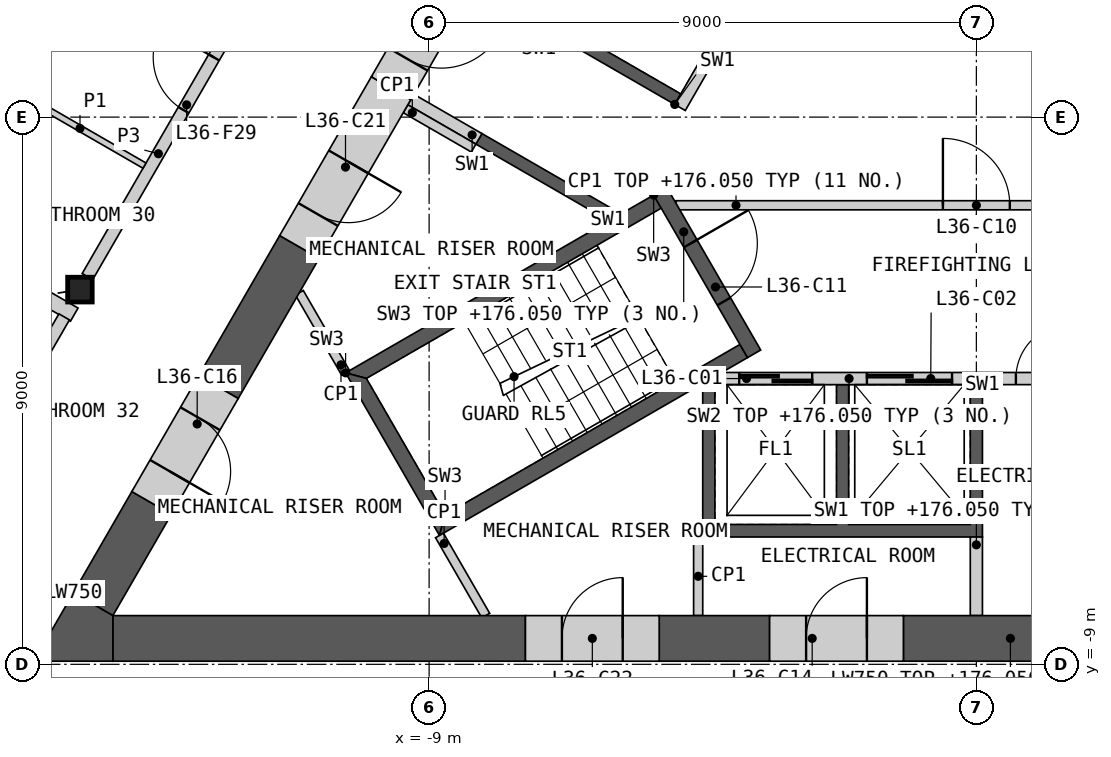
"""IFC4 building model, lengths in metres.
Left out: names, types, materials, properties, quantities, classifications, styles, units other than length and angle.
Written with IfcOpenShell. Run it as: python <this file> out.ifc"""

import sys

from ifc_helpers import new_model, si_unit, direction, frame, frame_2d, origin, origin_2d, place, context, subcontext, project, spatial, polyline, rectangle, i_section, outline, extrude, element, fill, save


model = new_model("IFC4")
c1 = context("Model", 3, precision=1e-05, world=origin(), true_north=direction((0.0, 1.0)))
c2 = subcontext(c1, "Body", "Model", "MODEL_VIEW")
j1 = project(units=[si_unit("LENGTHUNIT", "METRE"), si_unit("PLANEANGLEUNIT", "RADIAN")], contexts=[c1])
p1 = place(None, origin())
s1 = spatial("IfcSite", under=j1, at=p1, CompositionType="ELEMENT")
p2 = place(p1, origin())
s2 = spatial("IfcBuilding", under=s1, at=p2, CompositionType="ELEMENT")
p3 = place(p2, frame((0.0, 0.0, 172.8)))
s3 = spatial("IfcBuildingStorey", under=s2, at=p3, CompositionType="ELEMENT", Elevation=172.8)
p4 = place(p3, frame((-14.743, -2.837, 0.0), z_axis=(0.0, 0.0, 1.0), x_axis=(1.0, 0.0, 0.0)))
e1 = element("IfcColumn", 1, at=p4, inside=s3, PredefinedType="COLUMN", context=c2, shape_type="SweptSolid", body=[
    extrude(i_section(OverallWidth=0.404, OverallDepth=0.407, WebThickness=0.027, FlangeThickness=0.044, at=origin_2d()), origin(), (0.0, 0.0, 1.0), 3.6),
])
p5 = place(p3, origin())
e2 = element("IfcWall", 2, at=p5, inside=s3, PredefinedType="SHEAR", context=c2, shape_type="SweptSolid", body=[
    extrude(outline(polyline([(0.1, -4.4), (0.1, -6.906), (-4.5, -6.906), (-4.5, -4.4), (-4.3, -4.4), (-4.3, -6.7), (-2.3, -6.7), (-2.3, -4.4), (-2.1, -4.4), (-2.1, -6.7), (-0.1, -6.7), (-0.1, -4.4), (0.1, -4.4)])), origin(), (0.0, 0.0, 1.0), 3.25),
])
p6 = place(p3, frame((-4.187, -4.3, 0.0), z_axis=(0.0, 0.0, 1.0), x_axis=(1.0, 0.0, 0.0)))
e3 = element("IfcWall", 3, at=p6, inside=s3, PredefinedType="SOLIDWALL", context=c2, shape_type="SweptSolid", body=[
    extrude(rectangle(XDim=8.373, YDim=0.2, at=frame_2d((4.187, 0.0))), origin(), (0.0, 0.0, 1.0), 3.25),
])
p7 = place(p6, frame((0.287, 0.0, 0.0)))
e4 = element("IfcOpeningElement", 4, at=p7, cuts=e3, PredefinedType="OPENING", context=c2, shape_type="SweptSolid", body=[
    extrude(rectangle(XDim=1.2, YDim=2.1, at=frame_2d((0.6, 1.05))), frame((0.0, 0.11, 0.0), z_axis=(0.0, -1.0, 0.0), x_axis=(1.0, 0.0, 0.0)), (0.0, 0.0, 1.0), 0.22),
])
p8 = place(p6, frame((2.387, 0.0, 0.0)))
e5 = element("IfcOpeningElement", 5, at=p8, cuts=e3, PredefinedType="OPENING", context=c2, shape_type="SweptSolid", body=[
    extrude(rectangle(XDim=1.4, YDim=2.1, at=frame_2d((0.7, 1.05))), frame((0.0, 0.11, 0.0), z_axis=(0.0, -1.0, 0.0), x_axis=(1.0, 0.0, 0.0)), (0.0, 0.0, 1.0), 0.22),
])
p9 = place(p6, frame((4.837, 0.0, 0.0)))
e6 = element("IfcOpeningElement", 6, at=p9, cuts=e3, PredefinedType="OPENING", context=c2, shape_type="SweptSolid", body=[
    extrude(rectangle(XDim=0.9, YDim=2.1, at=frame_2d((0.45, 1.05))), frame((0.0, 0.11, 0.0), z_axis=(0.0, -1.0, 0.0), x_axis=(1.0, 0.0, 0.0)), (0.0, 0.0, 1.0), 0.22),
])
p10 = place(p6, frame((6.887, 0.0, 0.0)))
e7 = element("IfcOpeningElement", 7, at=p10, cuts=e3, PredefinedType="OPENING", context=c2, shape_type="SweptSolid", body=[
    extrude(rectangle(XDim=1.2, YDim=2.1, at=frame_2d((0.6, 1.05))), frame((0.0, 0.11, 0.0), z_axis=(0.0, -1.0, 0.0), x_axis=(1.0, 0.0, 0.0)), (0.0, 0.0, 1.0), 0.22),
])
p11 = place(p3, frame((0.0, -6.906, 0.0), z_axis=(0.0, 0.0, 1.0), x_axis=(0.0, -1.0, 0.0)))
e8 = element("IfcWall", 8, at=p11, inside=s3, PredefinedType="SHEAR", context=c2, shape_type="SweptSolid", body=[
    extrude(rectangle(XDim=1.293, YDim=0.2, at=frame_2d((0.646, 0.0))), origin(), (0.0, 0.0, 1.0), 3.25),
])
p12 = place(p3, origin())
e9 = element("IfcWall", 9, at=p12, inside=s3, PredefinedType="SHEAR", context=c2, shape_type="SweptSolid", body=[
    extrude(outline(polyline([(-6.061, -1.697), (-8.231, -0.444), (-8.131, -0.271), (-5.96, -1.524), (-6.061, -1.697)])), origin(), (0.0, 0.0, 1.0), 3.25),
])
p13 = place(p3, origin())
e10 = element("IfcWall", 10, at=p13, inside=s3, PredefinedType="SHEAR", context=c2, shape_type="SweptSolid", body=[
    extrude(outline(polyline([(-4.96, 0.208), (-7.131, 1.461), (-3.731, 7.35), (-1.561, 6.097), (-1.66, 5.924), (-3.652, 7.074), (-4.652, 5.342), (-2.66, 4.192), (-2.76, 4.019), (-4.752, 5.169), (-5.752, 3.437), (-3.76, 2.287), (-3.861, 2.113), (-5.852, 3.263), (-6.852, 1.531), (-4.861, 0.381), (-4.96, 0.208)])), origin(), (0.0, 0.0, 1.0), 3.25),
])
p14 = place(p3, frame((-1.631, 5.776, 0.0), z_axis=(0.0, 0.0, 1.0), x_axis=(-0.499992876559, -0.866029516466, 0.0)))
e11 = element("IfcWall", 11, at=p14, inside=s3, PredefinedType="SOLIDWALL", context=c2, shape_type="SweptSolid", body=[
    extrude(rectangle(XDim=6.486, YDim=0.2, at=frame_2d((3.243, 0.0))), origin(), (0.0, 0.0, 1.0), 3.25),
])
p15 = place(p14, frame((0.337, 0.0, 0.0)))
e12 = element("IfcOpeningElement", 12, at=p15, cuts=e11, PredefinedType="OPENING", context=c2, shape_type="SweptSolid", body=[
    extrude(rectangle(XDim=1.1, YDim=2.1, at=frame_2d((0.55, 1.05))), frame((0.0, 0.11, 0.0), z_axis=(0.0, -1.0, 0.0), x_axis=(1.0, 0.0, 0.0)), (0.0, 0.0, 1.0), 0.22),
])
p16 = place(p14, frame((2.537, 0.0, 0.0)))
e13 = element("IfcOpeningElement", 13, at=p16, cuts=e11, PredefinedType="OPENING", context=c2, shape_type="SweptSolid", body=[
    extrude(rectangle(XDim=1.1, YDim=2.1, at=frame_2d((0.55, 1.05))), frame((0.0, 0.11, 0.0), z_axis=(0.0, -1.0, 0.0), x_axis=(1.0, 0.0, 0.0)), (0.0, 0.0, 1.0), 0.22),
])
p17 = place(p3, frame((-8.181, -0.357, 0.0), z_axis=(0.0, 0.0, 1.0), x_axis=(-0.866003189247, 0.500038474733, 0.0)))
e14 = element("IfcWall", 14, at=p17, inside=s3, PredefinedType="SHEAR", context=c2, shape_type="SweptSolid", body=[
    extrude(rectangle(XDim=1.293, YDim=0.2, at=frame_2d((0.646, 0.0))), origin(), (0.0, 0.0, 1.0), 3.25),
])
p18 = place(p3, frame((-4.941, -1.45, 0.0), z_axis=(0.0, 0.0, 1.0), x_axis=(1.0, 0.0, 0.0)))
e15 = element("IfcWall", 15, at=p18, inside=s3, PredefinedType="PARTITIONING", context=c2, shape_type="SweptSolid", body=[
    extrude(rectangle(XDim=9.882, YDim=0.15, at=frame_2d((4.941, 0.0))), origin(), (0.0, 0.0, 1.0), 3.25),
])
p19 = place(p18, frame((4.391, 0.0, 0.0)))
e16 = element("IfcOpeningElement", 16, at=p19, cuts=e15, PredefinedType="OPENING", context=c2, shape_type="SweptSolid", body=[
    extrude(rectangle(XDim=1.1, YDim=2.1, at=frame_2d((0.55, 1.05))), frame((0.0, 0.085, 0.0), z_axis=(0.0, -1.0, 0.0), x_axis=(1.0, 0.0, 0.0)), (0.0, 0.0, 1.0), 0.17),
])
p20 = place(p3, origin())
e17 = element("IfcWall", 17, at=p20, inside=s3, PredefinedType="SHEAR", context=c2, shape_type="SweptSolid", body=[
    extrude(outline(polyline([(-5.307, -1.281), (-10.374, -4.206), (-10.032, -4.298), (-5.182, -1.498), (-5.307, -1.281)])), origin(), (0.0, 0.0, 1.0), 3.25),
])
p21 = place(p3, origin())
e18 = element("IfcWall", 18, at=p21, inside=s3, PredefinedType="SHEAR", context=c2, shape_type="SweptSolid", body=[
    extrude(outline(polyline([(-10.374, -4.206), (-8.83, -6.881), (-8.738, -6.539), (-10.032, -4.298), (-10.374, -4.206)])), origin(), (0.0, 0.0, 1.0), 3.25),
])
p22 = place(p3, origin())
e19 = element("IfcWall", 19, at=p22, inside=s3, PredefinedType="SHEAR", context=c2, shape_type="SweptSolid", body=[
    extrude(outline(polyline([(-8.738, -6.539), (-8.83, -6.881), (-3.763, -3.956), (-3.888, -3.739), (-8.738, -6.539)])), origin(), (0.0, 0.0, 1.0), 3.25),
])
p23 = place(p3, frame((-5.199, -1.219, 0.0), z_axis=(0.0, 0.0, 1.0), x_axis=(0.499982516597, -0.866035497597, 0.0)))
e20 = element("IfcWall", 20, at=p23, inside=s3, PredefinedType="SHEAR", context=c2, shape_type="SweptSolid", body=[
    extrude(rectangle(XDim=3.088, YDim=0.25, at=frame_2d((1.544, 0.0))), origin(), (0.0, 0.0, 1.0), 3.25),
])
p24 = place(p23, frame((0.994, 0.0, 0.0)))
e21 = element("IfcOpeningElement", 21, at=p24, cuts=e20, PredefinedType="OPENING", context=c2, shape_type="SweptSolid", body=[
    extrude(rectangle(XDim=1.1, YDim=2.1, at=frame_2d((0.55, 1.05))), frame((0.0, 0.135, 0.0), z_axis=(0.0, -1.0, 0.0), x_axis=(1.0, 0.0, 0.0)), (0.0, 0.0, 1.0), 0.27),
])
for number, where, z_axis, x_axis in (
    (22, (-4.575, -6.906, 0.0), (0.0, 0.0, 1.0), (0.0, -1.0, 0.0)),
    (23, (-8.268, -0.509, 0.0), (0.0, 0.0, 1.0), (-0.866, 0.5, 0.0)),
):
    element("IfcWall", number, at=place(p3, frame(where, z_axis=z_axis, x_axis=x_axis)), inside=s3, PredefinedType="PARTITIONING", context=c2, shape_type="SweptSolid", body=[
        extrude(rectangle(XDim=1.293, YDim=0.15, at=frame_2d((0.646, 0.0))), origin(), (0.0, 0.0, 1.0), 3.25),
    ])
for number, where, z_axis, x_axis in (
    (24, (-8.83, -6.881, 0.0), (0.0, 0.0, 1.0), (0.5, -0.866, 0.0)),
    (25, (-10.374, -4.206, 0.0), (0.0, 0.0, 1.0), (-0.5, 0.866, 0.0)),
):
    element("IfcWall", number, at=place(p3, frame(where, z_axis=z_axis, x_axis=x_axis)), inside=s3, PredefinedType="PARTITIONING", context=c2, shape_type="SweptSolid", body=[
        extrude(rectangle(XDim=1.522, YDim=0.15, at=frame_2d((0.761, 0.0))), origin(), (0.0, 0.0, 1.0), 3.25),
    ])
p25 = place(p3, frame((-14.201, -8.574, 0.0), z_axis=(0.0, 0.0, 1.0), x_axis=(1.0, 0.0, 0.0)))
e26 = element("IfcWall", 26, at=p25, inside=s3, PredefinedType="SHEAR", context=c2, shape_type="SweptSolid", body=[
    extrude(rectangle(XDim=6.785, YDim=0.75, at=frame_2d((3.393, 0.0))), origin(), (0.0, 0.0, 1.0), 3.25),
])
p26 = place(p3, frame((-1.2, -8.574, 0.0), z_axis=(0.0, 0.0, 1.0), x_axis=(1.0, 0.0, 0.0)))
e27 = element("IfcWall", 27, at=p26, inside=s3, PredefinedType="SHEAR", context=c2, shape_type="SweptSolid", body=[
    extrude(rectangle(XDim=3.52, YDim=0.75, at=frame_2d((1.76, 0.0))), origin(), (0.0, 0.0, 1.0), 3.25),
])
p27 = place(p3, frame((-5.216, -8.574, 0.0), z_axis=(0.0, 0.0, 1.0), x_axis=(1.0, 0.0, 0.0)))
e28 = element("IfcWall", 28, at=p27, inside=s3, PredefinedType="SHEAR", context=c2, shape_type="SweptSolid", body=[
    extrude(rectangle(XDim=1.816, YDim=0.75, at=frame_2d((0.908, 0.0))), origin(), (0.0, 0.0, 1.0), 3.25),
])
p28 = place(p3, frame((-11.133, -2.135, 0.0), z_axis=(0.0, 0.0, 1.0), x_axis=(-0.499936812382, -0.866061882099, 0.0)))
e29 = element("IfcWall", 29, at=p28, inside=s3, PredefinedType="SHEAR", context=c2, shape_type="SweptSolid", body=[
    extrude(rectangle(XDim=2.662, YDim=0.75, at=frame_2d((1.331, 0.0))), origin(), (0.0, 0.0, 1.0), 3.25),
])
p29 = place(p3, frame((-13.564, -6.346, 0.0), z_axis=(0.0, 0.0, 1.0), x_axis=(-0.499989888488, -0.86603124159, 0.0)))
e30 = element("IfcWall", 30, at=p29, inside=s3, PredefinedType="SHEAR", context=c2, shape_type="SweptSolid", body=[
    extrude(rectangle(XDim=1.923, YDim=0.75, at=frame_2d((0.961, 0.0))), origin(), (0.0, 0.0, 1.0), 3.25),
])
p30 = place(p3, origin())
e31 = element("IfcWall", 31, at=p30, inside=s3, PredefinedType="SHEAR", context=c2, shape_type="SweptSolid", body=[
    extrude(outline(polyline([(-14.851, -7.824), (-14.201, -8.199), (-14.201, -8.949), (-15.5, -8.949), (-14.851, -7.824)])), origin(), (0.0, 0.0, 1.0), 3.25),
])
p31 = place(p3, frame((-3.4, -8.574, 0.0), z_axis=(0.0, 0.0, 1.0), x_axis=(1.0, 0.0, 0.0)))
e32 = element("IfcWall", 32, at=p31, inside=s3, PredefinedType="SHEAR", context=c2, shape_type="SweptSolid", body=[
    extrude(rectangle(XDim=2.2, YDim=0.75, at=frame_2d((1.1, 0.0))), origin(), (0.0, 0.0, 1.0), 3.25),
])
p32 = place(p31, frame((0.6, 0.0, 0.0)))
e33 = element("IfcOpeningElement", 33, at=p32, cuts=e32, PredefinedType="OPENING", context=c2, shape_type="SweptSolid", body=[
    extrude(rectangle(XDim=1.0, YDim=2.1, at=frame_2d((0.5, 1.05))), frame((0.0, 0.385, 0.0), z_axis=(0.0, -1.0, 0.0), x_axis=(1.0, 0.0, 0.0)), (0.0, 0.0, 1.0), 0.77),
])
p33 = place(p3, frame((-12.464, -4.441, 0.0), z_axis=(0.0, 0.0, 1.0), x_axis=(-0.499994660107, -0.866028486751, 0.0)))
e34 = element("IfcWall", 34, at=p33, inside=s3, PredefinedType="SHEAR", context=c2, shape_type="SweptSolid", body=[
    extrude(rectangle(XDim=2.2, YDim=0.75, at=frame_2d((1.1, 0.0))), origin(), (0.0, 0.0, 1.0), 3.25),
])
p34 = place(p33, frame((0.6, 0.0, 0.0)))
e35 = element("IfcOpeningElement", 35, at=p34, cuts=e34, PredefinedType="OPENING", context=c2, shape_type="SweptSolid", body=[
    extrude(rectangle(XDim=1.0, YDim=2.1, at=frame_2d((0.5, 1.05))), frame((0.0, 0.385, 0.0), z_axis=(0.0, -1.0, 0.0), x_axis=(1.0, 0.0, 0.0)), (0.0, 0.0, 1.0), 0.77),
])
p35 = place(p3, frame((-9.625, 0.477, 0.0), z_axis=(0.0, 0.0, 1.0), x_axis=(-0.499995718215, -0.86602787586, 0.0)))
e36 = element("IfcWall", 36, at=p35, inside=s3, PredefinedType="SHEAR", context=c2, shape_type="SweptSolid", body=[
    extrude(rectangle(XDim=3.016, YDim=0.75, at=frame_2d((1.508, 0.0))), origin(), (0.0, 0.0, 1.0), 3.25),
])
p36 = place(p35, frame((1.4, 0.0, 0.0)))
e37 = element("IfcOpeningElement", 37, at=p36, cuts=e36, PredefinedType="OPENING", context=c2, shape_type="SweptSolid", body=[
    extrude(rectangle(XDim=1.0, YDim=2.1, at=frame_2d((0.5, 1.05))), frame((0.0, 0.385, 0.0), z_axis=(0.0, -1.0, 0.0), x_axis=(1.0, 0.0, 0.0)), (0.0, 0.0, 1.0), 0.77),
])
p37 = place(p3, frame((-7.416, -8.574, 0.0), z_axis=(0.0, 0.0, 1.0), x_axis=(1.0, 0.0, 0.0)))
e38 = element("IfcWall", 38, at=p37, inside=s3, PredefinedType="SHEAR", context=c2, shape_type="SweptSolid", body=[
    extrude(rectangle(XDim=2.2, YDim=0.75, at=frame_2d((1.1, 0.0))), origin(), (0.0, 0.0, 1.0), 3.25),
])
p38 = place(p37, frame((0.6, 0.0, 0.0)))
e39 = element("IfcOpeningElement", 39, at=p38, cuts=e38, PredefinedType="OPENING", context=c2, shape_type="SweptSolid", body=[
    extrude(rectangle(XDim=1.0, YDim=2.1, at=frame_2d((0.5, 1.05))), frame((0.0, 0.385, 0.0), z_axis=(0.0, -1.0, 0.0), x_axis=(1.0, 0.0, 0.0)), (0.0, 0.0, 1.0), 0.77),
])
p39 = place(p3, frame((-8.525, 2.382, 0.0), z_axis=(0.0, 0.0, 1.0), x_axis=(-0.500077893725, -0.86598042715, 0.0)))
e40 = element("IfcWall", 40, at=p39, inside=s3, PredefinedType="SHEAR", context=c2, shape_type="SweptSolid", body=[
    extrude(rectangle(XDim=2.2, YDim=0.75, at=frame_2d((1.1, 0.0))), origin(), (0.0, 0.0, 1.0), 3.25),
])
p40 = place(p39, frame((0.55, 0.0, 0.0)))
e41 = element("IfcOpeningElement", 41, at=p40, cuts=e40, PredefinedType="OPENING", context=c2, shape_type="SweptSolid", body=[
    extrude(rectangle(XDim=1.1, YDim=2.1, at=frame_2d((0.55, 1.05))), frame((0.0, 0.385, 0.0), z_axis=(0.0, -1.0, 0.0), x_axis=(1.0, 0.0, 0.0)), (0.0, 0.0, 1.0), 0.77),
])
p41 = place(p3, frame((-26.164, 3.292, 0.0), z_axis=(0.0, 0.0, 1.0), x_axis=(0.866022412254, -0.500005181446, 0.0)))
e42 = element("IfcWall", 42, at=p41, inside=s3, PredefinedType="PARTITIONING", context=c2, shape_type="SweptSolid", body=[
    extrude(rectangle(XDim=13.081, YDim=0.25, at=frame_2d((6.541, 0.0))), origin(), (0.0, 0.0, 1.0), 2.404),
])
p42 = place(p3, frame((-14.619, -2.624, 0.0), z_axis=(0.0, 0.0, 1.0), x_axis=(0.50000393355, 0.866023132736, 0.0)))
e43 = element("IfcWall", 43, at=p42, inside=s3, PredefinedType="PARTITIONING", context=c2, shape_type="SweptSolid", body=[
    extrude(rectangle(XDim=9.335, YDim=0.2, at=frame_2d((4.667, 0.0))), origin(), (0.0, 0.0, 1.0), 3.25),
])
p43 = place(p42, frame((3.163, 0.0, 0.0)))
e44 = element("IfcOpeningElement", 44, at=p43, cuts=e43, PredefinedType="OPENING", context=c2, shape_type="SweptSolid", body=[
    extrude(rectangle(XDim=1.0, YDim=2.1, at=frame_2d((0.5, 1.05))), frame((0.0, 0.11, 0.0), z_axis=(0.0, -1.0, 0.0), x_axis=(1.0, 0.0, 0.0)), (0.0, 0.0, 1.0), 0.22),
])
p44 = place(p3, frame((-17.744, -8.035, 0.0), z_axis=(0.0, 0.0, 1.0), x_axis=(0.500007607708, 0.866021011428, 0.0)))
e45 = element("IfcWall", 45, at=p44, inside=s3, PredefinedType="PARTITIONING", context=c2, shape_type="SweptSolid", body=[
    extrude(rectangle(XDim=5.484, YDim=0.2, at=frame_2d((2.742, 0.0))), origin(), (0.0, 0.0, 1.0), 3.25),
])
p45 = place(p44, frame((0.352, 0.0, 0.0)))
e46 = element("IfcOpeningElement", 46, at=p45, cuts=e45, PredefinedType="OPENING", context=c2, shape_type="SweptSolid", body=[
    extrude(rectangle(XDim=1.1, YDim=2.1, at=frame_2d((0.55, 1.05))), frame((0.0, 0.11, 0.0), z_axis=(0.0, -1.0, 0.0), x_axis=(1.0, 0.0, 0.0)), (0.0, 0.0, 1.0), 0.22),
])
p46 = place(p3, frame((-15.802, 0.427, 0.0), z_axis=(0.0, 0.0, 1.0), x_axis=(0.866032905446, -0.499987006516, 0.0)))
e47 = element("IfcWall", 47, at=p46, inside=s3, PredefinedType="PARTITIONING", context=c2, shape_type="SweptSolid", body=[
    extrude(rectangle(XDim=2.45, YDim=0.1, at=frame_2d((1.225, 0.0))), origin(), (0.0, 0.0, 1.0), 2.404),
])
p47 = place(p7, origin())
e48 = element("IfcDoor", 48, at=p47, inside=s3, OperationType="SLIDING_TO_LEFT", PredefinedType="DOOR", context=c2, shape_type="SweptSolid", body=[
    extrude(rectangle(XDim=1.2, YDim=2.1, at=frame_2d((0.6, 1.05))), frame((0.0, 0.025, 0.0), z_axis=(0.0, -1.0, 0.0), x_axis=(1.0, 0.0, 0.0)), (0.0, 0.0, 1.0), 0.05),
])
fill(e4, e48)
p48 = place(p8, origin())
e49 = element("IfcDoor", 49, at=p48, inside=s3, OperationType="SLIDING_TO_LEFT", PredefinedType="DOOR", context=c2, shape_type="SweptSolid", body=[
    extrude(rectangle(XDim=1.4, YDim=2.1, at=frame_2d((0.7, 1.05))), frame((0.0, 0.025, 0.0), z_axis=(0.0, -1.0, 0.0), x_axis=(1.0, 0.0, 0.0)), (0.0, 0.0, 1.0), 0.05),
])
fill(e5, e49)
p49 = place(p9, origin())
e50 = element("IfcDoor", 50, at=p49, inside=s3, OperationType="SINGLE_SWING_RIGHT", PredefinedType="DOOR", context=c2, shape_type="SweptSolid", body=[
    extrude(rectangle(XDim=0.9, YDim=2.1, at=frame_2d((0.45, 1.05))), frame((0.0, 0.025, 0.0), z_axis=(0.0, -1.0, 0.0), x_axis=(1.0, 0.0, 0.0)), (0.0, 0.0, 1.0), 0.05),
])
fill(e6, e50)
p50 = place(p19, origin())
e51 = element("IfcDoor", 51, at=p50, inside=s3, OperationType="SINGLE_SWING_LEFT", PredefinedType="DOOR", context=c2, shape_type="SweptSolid", body=[
    extrude(rectangle(XDim=1.1, YDim=2.1, at=frame_2d((0.55, 1.05))), frame((0.0, 0.025, 0.0), z_axis=(0.0, -1.0, 0.0), x_axis=(1.0, 0.0, 0.0)), (0.0, 0.0, 1.0), 0.05),
])
fill(e16, e51)
p51 = place(p24, origin())
e52 = element("IfcDoor", 52, at=p51, inside=s3, OperationType="SINGLE_SWING_LEFT", PredefinedType="DOOR", context=c2, shape_type="SweptSolid", body=[
    extrude(rectangle(XDim=1.1, YDim=2.1, at=frame_2d((0.55, 1.05))), frame((0.0, 0.025, 0.0), z_axis=(0.0, -1.0, 0.0), x_axis=(1.0, 0.0, 0.0)), (0.0, 0.0, 1.0), 0.05),
])
fill(e21, e52)
p52 = place(p32, origin())
e53 = element("IfcDoor", 53, at=p52, inside=s3, OperationType="SINGLE_SWING_RIGHT", PredefinedType="DOOR", context=c2, shape_type="SweptSolid", body=[
    extrude(rectangle(XDim=1.0, YDim=2.1, at=frame_2d((0.5, 1.05))), frame((0.0, 0.13, 0.0), z_axis=(0.0, -1.0, 0.0), x_axis=(1.0, 0.0, 0.0)), (0.0, 0.0, 1.0), 0.05),
])
fill(e33, e53)
p53 = place(p34, origin())
e54 = element("IfcDoor", 54, at=p53, inside=s3, OperationType="SINGLE_SWING_RIGHT", PredefinedType="DOOR", context=c2, shape_type="SweptSolid", body=[
    extrude(rectangle(XDim=1.0, YDim=2.1, at=frame_2d((0.5, 1.05))), frame((0.0, 0.13, 0.0), z_axis=(0.0, -1.0, 0.0), x_axis=(1.0, 0.0, 0.0)), (0.0, 0.0, 1.0), 0.05),
])
fill(e35, e54)
p54 = place(p36, origin())
e55 = element("IfcDoor", 55, at=p54, inside=s3, OperationType="SINGLE_SWING_LEFT", PredefinedType="DOOR", context=c2, shape_type="SweptSolid", body=[
    extrude(rectangle(XDim=1.0, YDim=2.1, at=frame_2d((0.5, 1.05))), frame((0.0, 0.13, 0.0), z_axis=(0.0, -1.0, 0.0), x_axis=(1.0, 0.0, 0.0)), (0.0, 0.0, 1.0), 0.05),
])
fill(e37, e55)
p55 = place(p38, origin())
e56 = element("IfcDoor", 56, at=p55, inside=s3, OperationType="SINGLE_SWING_RIGHT", PredefinedType="DOOR", context=c2, shape_type="SweptSolid", body=[
    extrude(rectangle(XDim=1.0, YDim=2.1, at=frame_2d((0.5, 1.05))), frame((0.0, 0.13, 0.0), z_axis=(0.0, -1.0, 0.0), x_axis=(1.0, 0.0, 0.0)), (0.0, 0.0, 1.0), 0.05),
])
fill(e39, e56)
p56 = place(p40, origin())
e57 = element("IfcDoor", 57, at=p56, inside=s3, OperationType="SINGLE_SWING_LEFT", PredefinedType="DOOR", context=c2, shape_type="SweptSolid", body=[
    extrude(rectangle(XDim=1.1, YDim=2.1, at=frame_2d((0.55, 1.05))), frame((0.0, 0.13, 0.0), z_axis=(0.0, -1.0, 0.0), x_axis=(1.0, 0.0, 0.0)), (0.0, 0.0, 1.0), 0.05),
])
fill(e41, e57)
p57 = place(p43, origin())
e58 = element("IfcDoor", 58, at=p57, inside=s3, OperationType="SINGLE_SWING_RIGHT", PredefinedType="DOOR", context=c2, shape_type="SweptSolid", body=[
    extrude(rectangle(XDim=1.0, YDim=2.1, at=frame_2d((0.5, 1.05))), frame((0.0, 0.025, 0.0), z_axis=(0.0, -1.0, 0.0), x_axis=(1.0, 0.0, 0.0)), (0.0, 0.0, 1.0), 0.05),
])
fill(e44, e58)
save(model, sys.argv[1])
